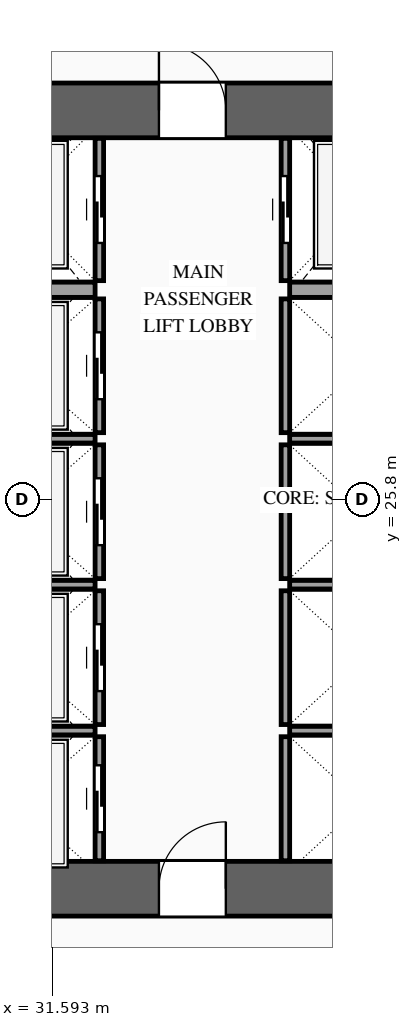
"""IFC4 building model, lengths in metres.
Left out: names, types, materials, properties, quantities, classifications, styles, units other than length and angle.
Written with IfcOpenShell. Run it as: python <this file> out.ifc"""

import sys

from ifc_helpers import new_model, si_unit, direction, frame, frame_2d, origin, place, context, subcontext, project, spatial, rectangle, extrude, source, transform, mapped, element, fill, save


model = new_model("IFC4")
c1 = context("Model", 3, precision=1e-05, world=origin(), true_north=direction((0.0, 1.0)))
c2 = subcontext(c1, "Body", "Model", "MODEL_VIEW")
j1 = project(units=[si_unit("LENGTHUNIT", "METRE"), si_unit("PLANEANGLEUNIT", "RADIAN")], contexts=[c1])
p1 = place(None, origin())
s1 = spatial("IfcSite", under=j1, at=p1, CompositionType="ELEMENT")
p2 = place(p1, origin())
s2 = spatial("IfcBuilding", under=s1, at=p2, CompositionType="ELEMENT")
p3 = place(p2, frame((0.0, 0.0, 56.8)))
s3 = spatial("IfcBuildingStorey", under=s2, at=p3, CompositionType="ELEMENT", Elevation=56.8)
p4 = place(p3, frame((23.35, 19.4, 0.0), z_axis=(0.0, 0.0, 1.0), x_axis=(1.0, 0.0, 0.0)))
e1 = element("IfcWall", 1, at=p4, inside=s3, PredefinedType="SHEAR", context=c2, shape_type="SweptSolid", body=[
    extrude(rectangle(XDim=27.3, YDim=0.9, at=frame_2d((13.65, 0.0))), origin(), (0.0, 0.0, 1.0), 3.6),
])
p5 = place(p4, frame((2.1, 0.0, 0.0)))
e2 = element("IfcOpeningElement", 2, at=p5, cuts=e1, PredefinedType="OPENING", context=c2, shape_type="SweptSolid", body=[
    extrude(rectangle(XDim=1.1, YDim=2.2, at=frame_2d((0.55, 1.1))), frame((0.0, 0.465, 0.0), z_axis=(0.0, -1.0, 0.0), x_axis=(1.0, 0.0, 0.0)), (0.0, 0.0, 1.0), 0.93),
])
p6 = place(p4, frame((10.0, 0.0, 0.0)))
e3 = element("IfcOpeningElement", 3, at=p6, cuts=e1, PredefinedType="OPENING", context=c2, shape_type="SweptSolid", body=[
    extrude(rectangle(XDim=1.1, YDim=2.2, at=frame_2d((0.55, 1.1))), frame((0.0, 0.465, 0.0), z_axis=(0.0, -1.0, 0.0), x_axis=(1.0, 0.0, 0.0)), (0.0, 0.0, 1.0), 0.93),
])
p7 = place(p4, frame((23.2, 0.0, 0.0)))
e4 = element("IfcOpeningElement", 4, at=p7, cuts=e1, PredefinedType="OPENING", context=c2, shape_type="SweptSolid", body=[
    extrude(rectangle(XDim=1.1, YDim=2.2, at=frame_2d((0.55, 1.1))), frame((0.0, 0.465, 0.0), z_axis=(0.0, -1.0, 0.0), x_axis=(1.0, 0.0, 0.0)), (0.0, 0.0, 1.0), 0.93),
])
p8 = place(p4, frame((19.82, 0.0, 0.0)))
e5 = element("IfcOpeningElement", 5, at=p8, cuts=e1, PredefinedType="OPENING", context=c2, shape_type="SweptSolid", body=[
    extrude(rectangle(XDim=0.9, YDim=2.15, at=frame_2d((0.45, 1.075))), frame((0.0, 0.465, 0.0), z_axis=(0.0, -1.0, 0.0), x_axis=(1.0, 0.0, 0.0)), (0.0, 0.0, 1.0), 0.93),
])
p9 = place(p4, frame((18.38, 0.0, 0.0)))
e6 = element("IfcOpeningElement", 6, at=p9, cuts=e1, PredefinedType="OPENING", context=c2, shape_type="SweptSolid", body=[
    extrude(rectangle(XDim=0.9, YDim=2.15, at=frame_2d((0.45, 1.075))), frame((0.0, 0.465, 0.0), z_axis=(0.0, -1.0, 0.0), x_axis=(1.0, 0.0, 0.0)), (0.0, 0.0, 1.0), 0.93),
])
p10 = place(p3, frame((23.35, 32.2, 0.0), z_axis=(0.0, 0.0, 1.0), x_axis=(1.0, 0.0, 0.0)))
e7 = element("IfcWall", 7, at=p10, inside=s3, PredefinedType="SHEAR", context=c2, shape_type="SweptSolid", body=[
    extrude(rectangle(XDim=27.3, YDim=0.9, at=frame_2d((13.65, 0.0))), origin(), (0.0, 0.0, 1.0), 3.6),
])
p11 = place(p10, frame((4.72, 0.0, 0.0)))
e8 = element("IfcOpeningElement", 8, at=p11, cuts=e7, PredefinedType="OPENING", context=c2, shape_type="SweptSolid", body=[
    extrude(rectangle(XDim=0.9, YDim=2.15, at=frame_2d((0.45, 1.075))), frame((0.0, 0.465, 0.0), z_axis=(0.0, -1.0, 0.0), x_axis=(1.0, 0.0, 0.0)), (0.0, 0.0, 1.0), 0.93),
])
p12 = place(p10, frame((10.0, 0.0, 0.0)))
e9 = element("IfcOpeningElement", 9, at=p12, cuts=e7, PredefinedType="OPENING", context=c2, shape_type="SweptSolid", body=[
    extrude(rectangle(XDim=1.1, YDim=2.2, at=frame_2d((0.55, 1.1))), frame((0.0, 0.465, 0.0), z_axis=(0.0, -1.0, 0.0), x_axis=(1.0, 0.0, 0.0)), (0.0, 0.0, 1.0), 0.93),
])
p13 = place(p10, frame((15.85, 0.0, 0.0)))
e10 = element("IfcOpeningElement", 10, at=p13, cuts=e7, PredefinedType="OPENING", context=c2, shape_type="SweptSolid", body=[
    extrude(rectangle(XDim=1.1, YDim=2.2, at=frame_2d((0.55, 1.1))), frame((0.0, 0.465, 0.0), z_axis=(0.0, -1.0, 0.0), x_axis=(1.0, 0.0, 0.0)), (0.0, 0.0, 1.0), 0.93),
])
p14 = place(p10, frame((19.82, 0.0, 0.0)))
e11 = element("IfcOpeningElement", 11, at=p14, cuts=e7, PredefinedType="OPENING", context=c2, shape_type="SweptSolid", body=[
    extrude(rectangle(XDim=0.9, YDim=2.15, at=frame_2d((0.45, 1.075))), frame((0.0, 0.465, 0.0), z_axis=(0.0, -1.0, 0.0), x_axis=(1.0, 0.0, 0.0)), (0.0, 0.0, 1.0), 0.93),
])
p15 = place(p3, frame((32.37, 19.86, 0.0), z_axis=(0.0, 0.0, 1.0), x_axis=(0.0, 1.0, 0.0)))
e12 = element("IfcWall", 12, at=p15, inside=s3, PredefinedType="SOLIDWALL", context=c2, shape_type="SweptSolid", body=[
    extrude(rectangle(XDim=2.04, YDim=0.14, at=frame_2d((1.02, 0.0))), origin(), (0.0, 0.0, 1.0), 3.38),
])
p16 = place(p15, frame((0.47, 0.0, 0.0)))
e13 = element("IfcOpeningElement", 13, at=p16, cuts=e12, PredefinedType="OPENING", context=c2, shape_type="SweptSolid", body=[
    extrude(rectangle(XDim=1.1, YDim=2.2, at=frame_2d((0.55, 1.1))), frame((0.0, 0.085, 0.0), z_axis=(0.0, -1.0, 0.0), x_axis=(1.0, 0.0, 0.0)), (0.0, 0.0, 1.0), 0.17),
])
m1 = source(origin(), c2, "Body", "SweptSolid", [
    extrude(rectangle(XDim=2.5, YDim=0.14, at=frame_2d((1.25, 0.0))), origin(), (0.0, 0.0, 1.0), 3.38),
])
p17 = place(p3, frame((29.8, 22.0, 0.0), z_axis=(0.0, 0.0, 1.0), x_axis=(1.0, 0.0, 0.0)))
e14 = element("IfcWall", 14, at=p17, inside=s3, PredefinedType="SOLIDWALL", context=c2, shape_type="MappedRepresentation", body=[
    mapped(m1, transform((0.0, 0.0, 0.0), scale=1.0)),
])
p18 = place(p3, frame((32.37, 22.1, 0.0), z_axis=(0.0, 0.0, 1.0), x_axis=(0.0, 1.0, 0.0)))
e15 = element("IfcWall", 15, at=p18, inside=s3, PredefinedType="SOLIDWALL", context=c2, shape_type="SweptSolid", body=[
    extrude(rectangle(XDim=2.2, YDim=0.14, at=frame_2d((1.1, 0.0))), origin(), (0.0, 0.0, 1.0), 3.38),
])
p19 = place(p18, frame((0.55, 0.0, 0.0)))
e16 = element("IfcOpeningElement", 16, at=p19, cuts=e15, PredefinedType="OPENING", context=c2, shape_type="SweptSolid", body=[
    extrude(rectangle(XDim=1.1, YDim=2.2, at=frame_2d((0.55, 1.1))), frame((0.0, 0.085, 0.0), z_axis=(0.0, -1.0, 0.0), x_axis=(1.0, 0.0, 0.0)), (0.0, 0.0, 1.0), 0.17),
])
p20 = place(p3, frame((29.8, 24.4, 0.0), z_axis=(0.0, 0.0, 1.0), x_axis=(1.0, 0.0, 0.0)))
e17 = element("IfcWall", 17, at=p20, inside=s3, PredefinedType="SOLIDWALL", context=c2, shape_type="MappedRepresentation", body=[
    mapped(m1, transform((0.0, 0.0, 0.0), scale=1.0)),
])
p21 = place(p3, frame((32.37, 24.5, 0.0), z_axis=(0.0, 0.0, 1.0), x_axis=(0.0, 1.0, 0.0)))
e18 = element("IfcWall", 18, at=p21, inside=s3, PredefinedType="SOLIDWALL", context=c2, shape_type="SweptSolid", body=[
    extrude(rectangle(XDim=2.2, YDim=0.14, at=frame_2d((1.1, 0.0))), origin(), (0.0, 0.0, 1.0), 3.38),
])
p22 = place(p21, frame((0.55, 0.0, 0.0)))
e19 = element("IfcOpeningElement", 19, at=p22, cuts=e18, PredefinedType="OPENING", context=c2, shape_type="SweptSolid", body=[
    extrude(rectangle(XDim=1.1, YDim=2.2, at=frame_2d((0.55, 1.1))), frame((0.0, 0.085, 0.0), z_axis=(0.0, -1.0, 0.0), x_axis=(1.0, 0.0, 0.0)), (0.0, 0.0, 1.0), 0.17),
])
p23 = place(p3, frame((29.8, 26.8, 0.0), z_axis=(0.0, 0.0, 1.0), x_axis=(1.0, 0.0, 0.0)))
e20 = element("IfcWall", 20, at=p23, inside=s3, PredefinedType="SOLIDWALL", context=c2, shape_type="MappedRepresentation", body=[
    mapped(m1, transform((0.0, 0.0, 0.0), scale=1.0)),
])
p24 = place(p3, frame((32.37, 26.9, 0.0), z_axis=(0.0, 0.0, 1.0), x_axis=(0.0, 1.0, 0.0)))
e21 = element("IfcWall", 21, at=p24, inside=s3, PredefinedType="SOLIDWALL", context=c2, shape_type="SweptSolid", body=[
    extrude(rectangle(XDim=2.2, YDim=0.14, at=frame_2d((1.1, 0.0))), origin(), (0.0, 0.0, 1.0), 3.38),
])
p25 = place(p24, frame((0.55, 0.0, 0.0)))
e22 = element("IfcOpeningElement", 22, at=p25, cuts=e21, PredefinedType="OPENING", context=c2, shape_type="SweptSolid", body=[
    extrude(rectangle(XDim=1.1, YDim=2.2, at=frame_2d((0.55, 1.1))), frame((0.0, 0.085, 0.0), z_axis=(0.0, -1.0, 0.0), x_axis=(1.0, 0.0, 0.0)), (0.0, 0.0, 1.0), 0.17),
])
p26 = place(p3, frame((32.37, 29.4, 0.0), z_axis=(0.0, 0.0, 1.0), x_axis=(0.0, 1.0, 0.0)))
e23 = element("IfcWall", 23, at=p26, inside=s3, PredefinedType="SOLIDWALL", context=c2, shape_type="SweptSolid", body=[
    extrude(rectangle(XDim=2.34, YDim=0.14, at=frame_2d((1.17, 0.0))), origin(), (0.0, 0.0, 1.0), 3.38),
])
p27 = place(p26, frame((0.62, 0.0, 0.0)))
e24 = element("IfcOpeningElement", 24, at=p27, cuts=e23, PredefinedType="OPENING", context=c2, shape_type="SweptSolid", body=[
    extrude(rectangle(XDim=1.1, YDim=2.2, at=frame_2d((0.55, 1.1))), frame((0.0, 0.085, 0.0), z_axis=(0.0, -1.0, 0.0), x_axis=(1.0, 0.0, 0.0)), (0.0, 0.0, 1.0), 0.17),
])
m2 = source(origin(), c2, "Body", "SweptSolid", [
    extrude(rectangle(XDim=2.5, YDim=0.25, at=frame_2d((1.25, 0.0))), origin(), (0.0, 0.0, 1.0), 3.38),
])
p28 = place(p3, frame((29.8, 29.25, 0.0), z_axis=(0.0, 0.0, 1.0), x_axis=(1.0, 0.0, 0.0)))
e25 = element("IfcWall", 25, at=p28, inside=s3, PredefinedType="SOLIDWALL", context=c2, shape_type="MappedRepresentation", body=[
    mapped(m2, transform((0.0, 0.0, 0.0), scale=1.0)),
])
m3 = source(origin(), c2, "Body", "SweptSolid", [
    extrude(rectangle(XDim=2.04, YDim=0.14, at=frame_2d((1.02, 0.0))), origin(), (0.0, 0.0, 1.0), 3.38),
])
p29 = place(p3, frame((35.43, 19.86, 0.0), z_axis=(0.0, 0.0, 1.0), x_axis=(0.0, 1.0, 0.0)))
e26 = element("IfcWall", 26, at=p29, inside=s3, PredefinedType="SOLIDWALL", context=c2, shape_type="MappedRepresentation", body=[
    mapped(m3, transform((0.0, 0.0, 0.0), scale=1.0)),
])
m4 = source(origin(), c2, "Body", "SweptSolid", [
    extrude(rectangle(XDim=2.4, YDim=0.14, at=frame_2d((1.2, 0.0))), origin(), (0.0, 0.0, 1.0), 3.38),
])
p30 = place(p3, frame((35.5, 22.0, 0.0), z_axis=(0.0, 0.0, 1.0), x_axis=(1.0, 0.0, 0.0)))
e27 = element("IfcWall", 27, at=p30, inside=s3, PredefinedType="SOLIDWALL", context=c2, shape_type="MappedRepresentation", body=[
    mapped(m4, transform((0.0, 0.0, 0.0), scale=1.0)),
])
m5 = source(origin(), c2, "Body", "SweptSolid", [
    extrude(rectangle(XDim=2.2, YDim=0.14, at=frame_2d((1.1, 0.0))), origin(), (0.0, 0.0, 1.0), 3.38),
])
p31 = place(p3, frame((35.43, 22.1, 0.0), z_axis=(0.0, 0.0, 1.0), x_axis=(0.0, 1.0, 0.0)))
e28 = element("IfcWall", 28, at=p31, inside=s3, PredefinedType="SOLIDWALL", context=c2, shape_type="MappedRepresentation", body=[
    mapped(m5, transform((0.0, 0.0, 0.0), scale=1.0)),
])
p32 = place(p3, frame((35.5, 24.4, 0.0), z_axis=(0.0, 0.0, 1.0), x_axis=(1.0, 0.0, 0.0)))
e29 = element("IfcWall", 29, at=p32, inside=s3, PredefinedType="SOLIDWALL", context=c2, shape_type="MappedRepresentation", body=[
    mapped(m4, transform((0.0, 0.0, 0.0), scale=1.0)),
])
p33 = place(p3, frame((35.43, 24.5, 0.0), z_axis=(0.0, 0.0, 1.0), x_axis=(0.0, 1.0, 0.0)))
e30 = element("IfcWall", 30, at=p33, inside=s3, PredefinedType="SOLIDWALL", context=c2, shape_type="MappedRepresentation", body=[
    mapped(m5, transform((0.0, 0.0, 0.0), scale=1.0)),
])
p34 = place(p3, frame((35.5, 26.8, 0.0), z_axis=(0.0, 0.0, 1.0), x_axis=(1.0, 0.0, 0.0)))
e31 = element("IfcWall", 31, at=p34, inside=s3, PredefinedType="SOLIDWALL", context=c2, shape_type="MappedRepresentation", body=[
    mapped(m4, transform((0.0, 0.0, 0.0), scale=1.0)),
])
m6 = source(origin(), c2, "Body", "SweptSolid", [
    extrude(rectangle(XDim=2.2, YDim=0.14, at=frame_2d((1.1, 0.0))), origin(), (0.0, 0.0, 1.0), 3.38),
])
p35 = place(p3, frame((35.43, 26.9, 0.0), z_axis=(0.0, 0.0, 1.0), x_axis=(0.0, 1.0, 0.0)))
e32 = element("IfcWall", 32, at=p35, inside=s3, PredefinedType="SOLIDWALL", context=c2, shape_type="MappedRepresentation", body=[
    mapped(m6, transform((0.0, 0.0, 0.0), scale=1.0)),
])
p36 = place(p3, frame((35.43, 29.4, 0.0), z_axis=(0.0, 0.0, 1.0), x_axis=(0.0, 1.0, 0.0)))
e33 = element("IfcWall", 33, at=p36, inside=s3, PredefinedType="SOLIDWALL", context=c2, shape_type="SweptSolid", body=[
    extrude(rectangle(XDim=2.34, YDim=0.14, at=frame_2d((1.17, 0.0))), origin(), (0.0, 0.0, 1.0), 3.38),
])
p37 = place(p36, frame((0.62, 0.0, 0.0)))
e34 = element("IfcOpeningElement", 34, at=p37, cuts=e33, PredefinedType="OPENING", context=c2, shape_type="SweptSolid", body=[
    extrude(rectangle(XDim=1.1, YDim=2.2, at=frame_2d((0.55, 1.1))), frame((0.0, 0.085, 0.0), z_axis=(0.0, -1.0, 0.0), x_axis=(1.0, 0.0, 0.0)), (0.0, 0.0, 1.0), 0.17),
])
m7 = source(origin(), c2, "Body", "SweptSolid", [
    extrude(rectangle(XDim=2.4, YDim=0.25, at=frame_2d((1.2, 0.0))), origin(), (0.0, 0.0, 1.0), 3.38),
])
p38 = place(p3, frame((35.5, 29.25, 0.0), z_axis=(0.0, 0.0, 1.0), x_axis=(1.0, 0.0, 0.0)))
e35 = element("IfcWall", 35, at=p38, inside=s3, PredefinedType="SOLIDWALL", context=c2, shape_type="MappedRepresentation", body=[
    mapped(m7, transform((0.0, 0.0, 0.0), scale=1.0)),
])
m8 = source(origin(), c2, "Body", "SweptSolid", [
    extrude(rectangle(XDim=1.1, YDim=2.2, at=frame_2d((0.55, 1.1))), frame((0.0, 0.025, 0.0), z_axis=(0.0, -1.0, 0.0), x_axis=(1.0, 0.0, 0.0)), (0.0, 0.0, 1.0), 0.05),
])
p39 = place(p16, origin())
e36 = element("IfcDoor", 36, at=p39, inside=s3, OperationType="SLIDING_TO_LEFT", PredefinedType="DOOR", context=c2, shape_type="MappedRepresentation", body=[
    mapped(m8, transform((0.0, 0.0, 0.0), scale=1.0)),
])
fill(e13, e36)
p40 = place(p19, origin())
e37 = element("IfcDoor", 37, at=p40, inside=s3, OperationType="SLIDING_TO_RIGHT", PredefinedType="DOOR", context=c2, shape_type="MappedRepresentation", body=[
    mapped(m8, transform((0.0, 0.0, 0.0), scale=1.0)),
])
fill(e16, e37)
p41 = place(p22, origin())
e38 = element("IfcDoor", 38, at=p41, inside=s3, OperationType="SLIDING_TO_LEFT", PredefinedType="DOOR", context=c2, shape_type="MappedRepresentation", body=[
    mapped(m8, transform((0.0, 0.0, 0.0), scale=1.0)),
])
fill(e19, e38)
p42 = place(p25, origin())
e39 = element("IfcDoor", 39, at=p42, inside=s3, OperationType="SLIDING_TO_RIGHT", PredefinedType="DOOR", context=c2, shape_type="MappedRepresentation", body=[
    mapped(m8, transform((0.0, 0.0, 0.0), scale=1.0)),
])
fill(e22, e39)
p43 = place(p27, origin())
e40 = element("IfcDoor", 40, at=p43, inside=s3, OperationType="SLIDING_TO_LEFT", PredefinedType="DOOR", context=c2, shape_type="MappedRepresentation", body=[
    mapped(m8, transform((0.0, 0.0, 0.0), scale=1.0)),
])
fill(e24, e40)
p44 = place(p37, origin())
e41 = element("IfcDoor", 41, at=p44, inside=s3, OperationType="SLIDING_TO_RIGHT", PredefinedType="DOOR", context=c2, shape_type="MappedRepresentation", body=[
    mapped(m8, transform((0.0, 0.0, 0.0), scale=1.0)),
])
fill(e34, e41)
m9 = source(origin(), c2, "Body", "SweptSolid", [
    extrude(rectangle(XDim=1.1, YDim=2.2, at=frame_2d((0.55, 1.1))), frame((0.0, 0.025, 0.0), z_axis=(0.0, -1.0, 0.0), x_axis=(1.0, 0.0, 0.0)), (0.0, 0.0, 1.0), 0.05),
])
p45 = place(p6, origin())
e42 = element("IfcDoor", 42, at=p45, inside=s3, OperationType="SINGLE_SWING_RIGHT", PredefinedType="DOOR", context=c2, shape_type="MappedRepresentation", body=[
    mapped(m9, transform((0.0, 0.0, 0.0), scale=1.0)),
])
fill(e3, e42)
p46 = place(p12, origin())
e43 = element("IfcDoor", 43, at=p46, inside=s3, OperationType="SINGLE_SWING_LEFT", PredefinedType="DOOR", context=c2, shape_type="MappedRepresentation", body=[
    mapped(m9, transform((0.0, 0.0, 0.0), scale=1.0)),
])
fill(e9, e43)
save(model, sys.argv[1])
